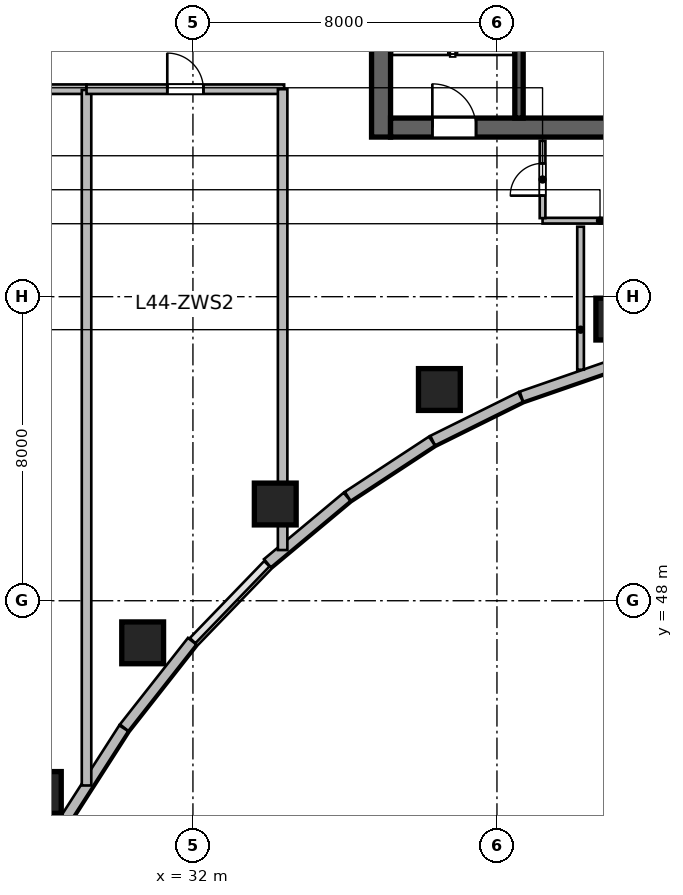
"""IFC4 building model, lengths in metres.
Left out: names, types, materials, properties, quantities, classifications, styles, units other than length and angle.
Written with IfcOpenShell. Run it as: python <this file> out.ifc"""

import sys

from ifc_helpers import new_model, si_unit, direction, frame, frame_2d, origin, origin_2d, place, context, subcontext, project, spatial, rectangle, circle, extrude, source, transform, mapped, element, fill, save


model = new_model("IFC4")
c1 = context("Model", 3, precision=1e-05, world=origin(), true_north=direction((0.0, 1.0)))
c2 = subcontext(c1, "Body", "Model", "MODEL_VIEW")
j1 = project(units=[si_unit("LENGTHUNIT", "METRE"), si_unit("PLANEANGLEUNIT", "RADIAN")], contexts=[c1])
p1 = place(None, origin())
s1 = spatial("IfcSite", under=j1, at=p1, CompositionType="ELEMENT")
p2 = place(p1, origin())
s2 = spatial("IfcBuilding", under=s1, at=p2, CompositionType="ELEMENT")
p3 = place(p2, frame((0.0, 0.0, 181.8)))
s3 = spatial("IfcBuildingStorey", under=s2, at=p3, CompositionType="ELEMENT", Elevation=181.8)
m1 = source(origin(), c2, "Body", "SweptSolid", [
    extrude(rectangle(XDim=12.0, YDim=0.5, at=frame_2d((6.0, 0.0))), origin(), (0.0, 0.0, 1.0), 3.9),
])
p4 = place(p3, frame((36.95, 60.2, 0.0), z_axis=(0.0, 0.0, 1.0), x_axis=(0.0, 1.0, 0.0)))
e1 = element("IfcWall", 1, at=p4, inside=s3, PredefinedType="SHEAR", context=c2, shape_type="MappedRepresentation", body=[
    mapped(m1, transform((0.0, 0.0, 0.0), scale=1.0)),
])
m2 = source(origin(), c2, "Body", "SweptSolid", [
    extrude(rectangle(XDim=21.6, YDim=0.5, at=frame_2d((10.8, 0.0))), origin(), (0.0, 0.0, 1.0), 3.9),
])
p5 = place(p3, frame((37.2, 60.45, 0.0), z_axis=(0.0, 0.0, 1.0), x_axis=(1.0, 0.0, 0.0)))
e2 = element("IfcWall", 2, at=p5, inside=s3, PredefinedType="SHEAR", context=c2, shape_type="MappedRepresentation", body=[
    mapped(m2, transform((0.0, 0.0, 0.0), scale=1.0)),
])
p6 = place(p5, frame((1.1, 0.0, 0.0)))
e3 = element("IfcOpeningElement", 3, at=p6, cuts=e2, PredefinedType="OPENING", context=c2, shape_type="SweptSolid", body=[
    extrude(rectangle(XDim=1.15, YDim=2.15, at=frame_2d((0.575, 1.075))), frame((0.0, 0.26, 0.0), z_axis=(0.0, -1.0, 0.0), x_axis=(1.0, 0.0, 0.0)), (0.0, 0.0, 1.0), 0.52),
])
p7 = place(p5, frame((19.5, 0.0, 0.0)))
e4 = element("IfcOpeningElement", 4, at=p7, cuts=e2, PredefinedType="OPENING", context=c2, shape_type="SweptSolid", body=[
    extrude(rectangle(XDim=0.9, YDim=2.1, at=frame_2d((0.45, 1.05))), frame((0.0, 0.26, 0.0), z_axis=(0.0, -1.0, 0.0), x_axis=(1.0, 0.0, 0.0)), (0.0, 0.0, 1.0), 0.52),
])
p8 = place(p5, frame((12.02, 0.0, 0.0)))
e5 = element("IfcOpeningElement", 5, at=p8, cuts=e2, PredefinedType="OPENING", context=c2, shape_type="SweptSolid", body=[
    extrude(rectangle(XDim=1.6, YDim=2.15, at=frame_2d((0.8, 1.075))), frame((0.0, 0.26, 0.0), z_axis=(0.0, -1.0, 0.0), x_axis=(1.0, 0.0, 0.0)), (0.0, 0.0, 1.0), 0.52),
])
m3 = source(origin(), c2, "Body", "SweptSolid", [
    extrude(rectangle(XDim=11.0, YDim=0.22, at=frame_2d((5.5, 0.0))), origin(), (0.0, 0.0, 1.0), 3.9),
])
p9 = place(p3, frame((40.58, 60.7, 0.0), z_axis=(0.0, 0.0, 1.0), x_axis=(0.0, 1.0, 0.0)))
e6 = element("IfcWall", 6, at=p9, inside=s3, PredefinedType="SHEAR", context=c2, shape_type="MappedRepresentation", body=[
    mapped(m3, transform((0.0, 0.0, 0.0), scale=1.0)),
])
m4 = source(origin(), c2, "Body", "SweptSolid", [
    extrude(circle(Radius=0.55, at=origin_2d()), origin(), (0.0, 0.0, 1.0), 3.9),
])
for number, where, z_axis, x_axis in (
    (7, (27.985, 42.955, 0.0), (0.0, 0.0, 1.0), (-0.691, 0.723, 0.0)),
    (8, (30.677, 46.892, 0.0), (0.0, 0.0, 1.0), (-0.571, 0.821, 0.0)),
    (9, (34.166, 50.545, 0.0), (0.0, 0.0, 1.0), (-0.436, 0.9, 0.0)),
    (10, (38.485, 53.558, 0.0), (0.0, 0.0, 1.0), (-0.289, 0.957, 0.0)),
    (11, (43.154, 55.411, 0.0), (0.0, 0.0, 1.0), (-0.143, 0.99, 0.0)),
):
    element("IfcColumn", number, at=place(p3, frame(where, z_axis=z_axis, x_axis=x_axis)), inside=s3, PredefinedType="COLUMN", context=c2, shape_type="MappedRepresentation", body=[
        mapped(m4, transform((0.0, 0.0, 0.0), scale=1.0)),
    ])
m5 = source(origin(), c2, "Body", "SweptSolid", [
    extrude(rectangle(XDim=2.53, YDim=0.28, at=frame_2d((1.265, 0.0))), origin(), (0.0, 0.0, 1.0), 3.65),
])
p10 = place(p3, frame((43.035, 54.198, 0.0), z_axis=(0.0, 0.0, 1.0), x_axis=(-0.944872429646, -0.327438683872, 0.0)))
e12 = element("IfcWall", 12, at=p10, inside=s3, PredefinedType="SOLIDWALL", context=c2, shape_type="MappedRepresentation", body=[
    mapped(m5, transform((0.0, 0.0, 0.0), scale=1.0)),
])
m6 = source(origin(), c2, "Body", "SweptSolid", [
    extrude(rectangle(XDim=2.584, YDim=0.28, at=frame_2d((1.292, 0.0))), origin(), (0.0, 0.0, 1.0), 3.65),
])
p11 = place(p3, frame((40.624, 53.361, 0.0), z_axis=(0.0, 0.0, 1.0), x_axis=(-0.895989792847, -0.44407464588, 0.0)))
e13 = element("IfcWall", 13, at=p11, inside=s3, PredefinedType="SOLIDWALL", context=c2, shape_type="MappedRepresentation", body=[
    mapped(m6, transform((0.0, 0.0, 0.0), scale=1.0)),
])
m7 = source(origin(), c2, "Body", "SweptSolid", [
    extrude(rectangle(XDim=2.652, YDim=0.28, at=frame_2d((1.326, 0.0))), origin(), (0.0, 0.0, 1.0), 3.65),
])
p12 = place(p3, frame((38.289, 52.202, 0.0), z_axis=(0.0, 0.0, 1.0), x_axis=(-0.836008323535, -0.54871676025, 0.0)))
e14 = element("IfcWall", 14, at=p12, inside=s3, PredefinedType="SOLIDWALL", context=c2, shape_type="MappedRepresentation", body=[
    mapped(m7, transform((0.0, 0.0, 0.0), scale=1.0)),
])
m8 = source(origin(), c2, "Body", "SweptSolid", [
    extrude(rectangle(XDim=2.729, YDim=0.28, at=frame_2d((1.365, 0.0))), origin(), (0.0, 0.0, 1.0), 3.65),
])
p13 = place(p3, frame((36.055, 50.735, 0.0), z_axis=(0.0, 0.0, 1.0), x_axis=(-0.767957284255, -0.640501061326, 0.0)))
e15 = element("IfcWall", 15, at=p13, inside=s3, PredefinedType="SOLIDWALL", context=c2, shape_type="MappedRepresentation", body=[
    mapped(m8, transform((0.0, 0.0, 0.0), scale=1.0)),
])
m9 = source(origin(), c2, "Body", "SweptSolid", [
    extrude(rectangle(XDim=2.897, YDim=0.28, at=frame_2d((1.448, 0.0))), origin(), (0.0, 0.0, 1.0), 3.65),
])
p14 = place(p3, frame((31.979, 46.936, 0.0), z_axis=(0.0, 0.0, 1.0), x_axis=(-0.618167636915, -0.786046291685, 0.0)))
e16 = element("IfcWall", 16, at=p14, inside=s3, PredefinedType="SOLIDWALL", context=c2, shape_type="MappedRepresentation", body=[
    mapped(m9, transform((0.0, 0.0, 0.0), scale=1.0)),
])
m10 = source(origin(), c2, "Body", "SweptSolid", [
    extrude(rectangle(XDim=2.981, YDim=0.28, at=frame_2d((1.49, 0.0))), origin(), (0.0, 0.0, 1.0), 3.65),
])
p15 = place(p3, frame((30.179, 44.645, 0.0), z_axis=(0.0, 0.0, 1.0), x_axis=(-0.540194451908, -0.841540227278, 0.0)))
e17 = element("IfcWall", 17, at=p15, inside=s3, PredefinedType="SOLIDWALL", context=c2, shape_type="MappedRepresentation", body=[
    mapped(m10, transform((0.0, 0.0, 0.0), scale=1.0)),
])
m11 = source(origin(), c2, "Body", "SweptSolid", [
    extrude(rectangle(XDim=5.4, YDim=0.15, at=frame_2d((2.7, 0.0))), origin(), (0.0, 0.0, 1.0), 3.65),
])
p16 = place(p3, frame((41.2, 58.0, 0.0), z_axis=(0.0, 0.0, 1.0), x_axis=(1.0, 0.0, 0.0)))
e18 = element("IfcWall", 18, at=p16, inside=s3, PredefinedType="PARTITIONING", context=c2, shape_type="MappedRepresentation", body=[
    mapped(m11, transform((0.0, 0.0, 0.0), scale=1.0)),
])
p17 = place(p16, frame((2.25, 0.0, 0.0)))
e19 = element("IfcOpeningElement", 19, at=p17, cuts=e18, PredefinedType="OPENING", context=c2, shape_type="SweptSolid", body=[
    extrude(rectangle(XDim=0.9, YDim=2.08, at=frame_2d((0.45, 1.04))), frame((0.0, 0.085, 0.0), z_axis=(0.0, -1.0, 0.0), x_axis=(1.0, 0.0, 0.0)), (0.0, 0.0, 1.0), 0.17),
])
m12 = source(origin(), c2, "Body", "SweptSolid", [
    extrude(rectangle(XDim=2.033, YDim=0.15, at=frame_2d((1.016, 0.0))), origin(), (0.0, 0.0, 1.0), 3.65),
])
p18 = place(p3, frame((41.2, 58.067, 0.0), z_axis=(0.0, 0.0, 1.0), x_axis=(0.0, 1.0, 0.0)))
e20 = element("IfcWall", 20, at=p18, inside=s3, PredefinedType="PARTITIONING", context=c2, shape_type="MappedRepresentation", body=[
    mapped(m12, transform((0.0, 0.0, 0.0), scale=1.0)),
])
p19 = place(p18, frame((0.591, 0.0, 0.0)))
e21 = element("IfcOpeningElement", 21, at=p19, cuts=e20, PredefinedType="OPENING", context=c2, shape_type="SweptSolid", body=[
    extrude(rectangle(XDim=0.85, YDim=2.1, at=frame_2d((0.425, 1.05))), frame((0.0, 0.085, 0.0), z_axis=(0.0, -1.0, 0.0), x_axis=(1.0, 0.0, 0.0)), (0.0, 0.0, 1.0), 0.17),
])
m13 = source(origin(), c2, "Body", "SweptSolid", [
    extrude(rectangle(XDim=3.763, YDim=0.175, at=frame_2d((1.881, 0.0))), origin(), (0.0, 0.0, 1.0), 3.65),
])
p20 = place(p3, frame((42.2, 54.079, 0.0), z_axis=(0.0, 0.0, 1.0), x_axis=(0.0, 1.0, 0.0)))
e22 = element("IfcWall", 22, at=p20, inside=s3, PredefinedType="PARTITIONING", context=c2, shape_type="MappedRepresentation", body=[
    mapped(m13, transform((0.0, 0.0, 0.0), scale=1.0)),
])
m14 = source(origin(), c2, "Body", "SweptSolid", [
    extrude(rectangle(XDim=6.02, YDim=0.25, at=frame_2d((3.01, 0.0))), origin(), (0.0, 0.0, 1.0), 3.65),
])
p21 = place(p3, frame((23.18, 61.46, 0.0), z_axis=(0.0, 0.0, 1.0), x_axis=(1.0, 0.0, 0.0)))
e23 = element("IfcWall", 23, at=p21, inside=s3, PredefinedType="PARTITIONING", context=c2, shape_type="MappedRepresentation", body=[
    mapped(m14, transform((0.0, 0.0, 0.0), scale=1.0)),
])
p22 = place(p21, frame((2.535, 0.0, 0.0)))
e24 = element("IfcOpeningElement", 24, at=p22, cuts=e23, PredefinedType="OPENING", context=c2, shape_type="SweptSolid", body=[
    extrude(rectangle(XDim=0.95, YDim=2.1, at=frame_2d((0.475, 1.05))), frame((0.0, 0.135, 0.0), z_axis=(0.0, -1.0, 0.0), x_axis=(1.0, 0.0, 0.0)), (0.0, 0.0, 1.0), 0.27),
])
m15 = source(origin(), c2, "Body", "SweptSolid", [
    extrude(rectangle(XDim=18.301, YDim=0.25, at=frame_2d((9.15, 0.0))), origin(), (0.0, 0.0, 1.0), 2.942),
])
p23 = place(p3, frame((29.2, 43.139, 0.0), z_axis=(0.0, 0.0, 1.0), x_axis=(0.0, 1.0, 0.0)))
e25 = element("IfcWall", 25, at=p23, inside=s3, PredefinedType="PARTITIONING", context=c2, shape_type="MappedRepresentation", body=[
    mapped(m15, transform((0.0, 0.0, 0.0), scale=1.0)),
])
m16 = source(origin(), c2, "Body", "SweptSolid", [
    extrude(rectangle(XDim=5.2, YDim=0.25, at=frame_2d((2.6, 0.0))), origin(), (0.0, 0.0, 1.0), 3.65),
])
p24 = place(p3, frame((29.2, 61.46, 0.0), z_axis=(0.0, 0.0, 1.0), x_axis=(1.0, 0.0, 0.0)))
e26 = element("IfcWall", 26, at=p24, inside=s3, PredefinedType="PARTITIONING", context=c2, shape_type="MappedRepresentation", body=[
    mapped(m16, transform((0.0, 0.0, 0.0), scale=1.0)),
])
p25 = place(p24, frame((2.125, 0.0, 0.0)))
e27 = element("IfcOpeningElement", 27, at=p25, cuts=e26, PredefinedType="OPENING", context=c2, shape_type="SweptSolid", body=[
    extrude(rectangle(XDim=0.95, YDim=2.1, at=frame_2d((0.475, 1.05))), frame((0.0, 0.135, 0.0), z_axis=(0.0, -1.0, 0.0), x_axis=(1.0, 0.0, 0.0)), (0.0, 0.0, 1.0), 0.27),
])
m17 = source(origin(), c2, "Body", "SweptSolid", [
    extrude(rectangle(XDim=12.126, YDim=0.25, at=frame_2d((6.063, 0.0))), origin(), (0.0, 0.0, 1.0), 3.65),
])
p26 = place(p3, frame((34.36, 49.334, 0.0), z_axis=(0.0, 0.0, 1.0), x_axis=(0.0, 1.0, 0.0)))
e28 = element("IfcWall", 28, at=p26, inside=s3, PredefinedType="PARTITIONING", context=c2, shape_type="MappedRepresentation", body=[
    mapped(m17, transform((0.0, 0.0, 0.0), scale=1.0)),
])
m18 = source(origin(), c2, "Body", "SweptSolid", [
    extrude(rectangle(XDim=1.15, YDim=2.15, at=frame_2d((0.575, 1.075))), frame((0.0, 0.025, 0.0), z_axis=(0.0, -1.0, 0.0), x_axis=(1.0, 0.0, 0.0)), (0.0, 0.0, 1.0), 0.05),
])
p27 = place(p6, origin())
e29 = element("IfcDoor", 29, at=p27, inside=s3, OperationType="SINGLE_SWING_LEFT", PredefinedType="DOOR", context=c2, shape_type="MappedRepresentation", body=[
    mapped(m18, transform((0.0, 0.0, 0.0), scale=1.0)),
])
fill(e3, e29)
m19 = source(origin(), c2, "Body", "SweptSolid", [
    extrude(rectangle(XDim=0.85, YDim=2.1, at=frame_2d((0.425, 1.05))), frame((0.0, 0.025, 0.0), z_axis=(0.0, -1.0, 0.0), x_axis=(1.0, 0.0, 0.0)), (0.0, 0.0, 1.0), 0.05),
])
p28 = place(p19, origin())
e30 = element("IfcDoor", 30, at=p28, inside=s3, OperationType="SINGLE_SWING_LEFT", PredefinedType="DOOR", context=c2, shape_type="MappedRepresentation", body=[
    mapped(m19, transform((0.0, 0.0, 0.0), scale=1.0)),
])
fill(e21, e30)
m20 = source(origin(), c2, "Body", "SweptSolid", [
    extrude(rectangle(XDim=0.95, YDim=2.1, at=frame_2d((0.475, 1.05))), frame((0.0, 0.025, 0.0), z_axis=(0.0, -1.0, 0.0), x_axis=(1.0, 0.0, 0.0)), (0.0, 0.0, 1.0), 0.05),
])
p29 = place(p25, origin())
e31 = element("IfcDoor", 31, at=p29, inside=s3, OperationType="SINGLE_SWING_LEFT", PredefinedType="DOOR", context=c2, shape_type="MappedRepresentation", body=[
    mapped(m20, transform((0.0, 0.0, 0.0), scale=1.0)),
])
fill(e27, e31)
save(model, sys.argv[1])
